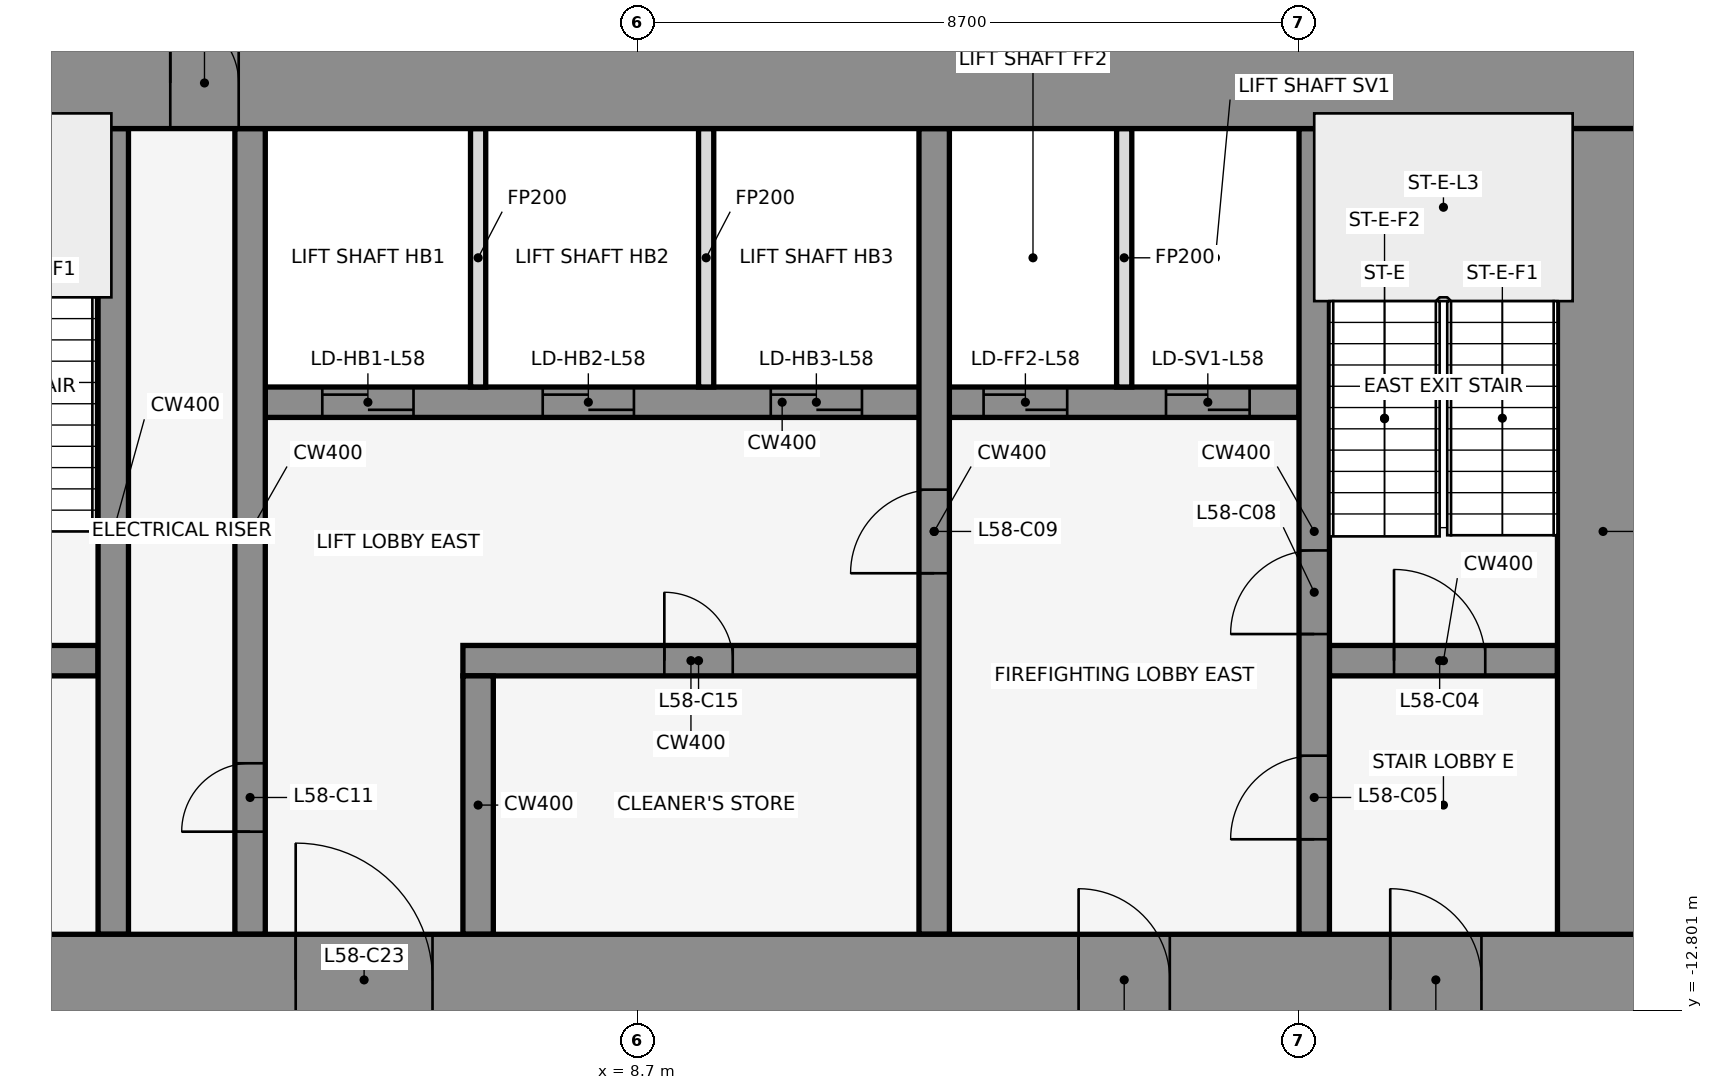
"""IFC4 building model, lengths in metres.
Left out: names, types, materials, properties, quantities, classifications, styles, units other than length and angle.
Written with IfcOpenShell. Run it as: python <this file> out.ifc"""

import sys

from ifc_helpers import new_model, si_unit, direction, frame, frame_2d, origin, place, context, subcontext, project, spatial, rectangle, extrude, element, fill, save


model = new_model("IFC4")
c1 = context("Model", 3, precision=1e-05, world=origin(), true_north=direction((0.0, 1.0)))
c2 = subcontext(c1, "Body", "Model", "MODEL_VIEW")
j1 = project(units=[si_unit("LENGTHUNIT", "METRE"), si_unit("PLANEANGLEUNIT", "RADIAN")], contexts=[c1])
p1 = place(None, origin())
s1 = spatial("IfcSite", under=j1, at=p1, CompositionType="ELEMENT")
p2 = place(p1, origin())
s2 = spatial("IfcBuilding", under=s1, at=p2, CompositionType="ELEMENT")
p3 = place(p2, frame((0.0, 0.0, 258.2)))
s3 = spatial("IfcBuildingStorey", under=s2, at=p3, CompositionType="ELEMENT", Elevation=258.2)
for number, where, z_axis, x_axis in (
    (1, (16.432, -0.105, 0.0), (0.0, 0.0, 1.0), (-0.84, 0.543, 0.0)),
    (2, (1.901, 1.08, 0.0), (0.0, 0.0, 1.0), (-0.84, -0.543, 0.0)),
):
    element("IfcWall", number, at=place(p3, frame(where, z_axis=z_axis, x_axis=x_axis)), inside=s3, PredefinedType="STANDARD", context=c2, shape_type="SweptSolid", body=[
        extrude(rectangle(XDim=2.183, YDim=0.25, at=frame_2d((1.091, 0.0))), origin(), (0.0, 0.0, 1.0), 4.05),
    ])
p4 = place(p3, frame((-1.6, -8.2, 0.0), z_axis=(0.0, 0.0, 1.0), x_axis=(1.0, 0.0, 0.0)))
e3 = element("IfcWall", 3, at=p4, inside=s3, PredefinedType="SHEAR", context=c2, shape_type="SweptSolid", body=[
    extrude(rectangle(XDim=3.2, YDim=0.4, at=frame_2d((1.6, 0.0))), origin(), (0.0, 0.0, 1.0), 4.2),
])
p5 = place(p4, frame((1.05, 0.0, 0.0)))
e4 = element("IfcOpeningElement", 4, at=p5, cuts=e3, PredefinedType="OPENING", context=c2, shape_type="SweptSolid", body=[
    extrude(rectangle(XDim=1.2, YDim=2.1, at=frame_2d((0.6, 1.05))), frame((0.0, 0.212, 0.0), z_axis=(0.0, -1.0, 0.0), x_axis=(1.0, 0.0, 0.0)), (0.0, 0.0, 1.0), 0.424),
])
p6 = place(p3, frame((6.4, -8.2, 0.0), z_axis=(0.0, 0.0, 1.0), x_axis=(1.0, 0.0, 0.0)))
e5 = element("IfcWall", 5, at=p6, inside=s3, PredefinedType="SHEAR", context=c2, shape_type="SweptSolid", body=[
    extrude(rectangle(XDim=6.0, YDim=0.4, at=frame_2d((3.0, 0.0))), origin(), (0.0, 0.0, 1.0), 4.2),
])
p7 = place(p6, frame((2.65, 0.0, 0.0)))
e6 = element("IfcOpeningElement", 6, at=p7, cuts=e5, PredefinedType="OPENING", context=c2, shape_type="SweptSolid", body=[
    extrude(rectangle(XDim=0.9, YDim=2.1, at=frame_2d((0.45, 1.05))), frame((0.0, 0.212, 0.0), z_axis=(0.0, -1.0, 0.0), x_axis=(1.0, 0.0, 0.0)), (0.0, 0.0, 1.0), 0.424),
])
p8 = place(p3, frame((17.8, -8.2, 0.0), z_axis=(0.0, 0.0, 1.0), x_axis=(1.0, 0.0, 0.0)))
e7 = element("IfcWall", 7, at=p8, inside=s3, PredefinedType="SHEAR", context=c2, shape_type="SweptSolid", body=[
    extrude(rectangle(XDim=3.0, YDim=0.4, at=frame_2d((1.5, 0.0))), origin(), (0.0, 0.0, 1.0), 4.2),
])
p9 = place(p8, frame((0.85, 0.0, 0.0)))
e8 = element("IfcOpeningElement", 8, at=p9, cuts=e7, PredefinedType="OPENING", context=c2, shape_type="SweptSolid", body=[
    extrude(rectangle(XDim=1.2, YDim=2.1, at=frame_2d((0.6, 1.05))), frame((0.0, 0.212, 0.0), z_axis=(0.0, -1.0, 0.0), x_axis=(1.0, 0.0, 0.0)), (0.0, 0.0, 1.0), 0.424),
])
p10 = place(p3, frame((3.8, -4.8, 0.0), z_axis=(0.0, 0.0, 1.0), x_axis=(1.0, 0.0, 0.0)))
e9 = element("IfcWall", 9, at=p10, inside=s3, PredefinedType="SHEAR", context=c2, shape_type="SweptSolid", body=[
    extrude(rectangle(XDim=13.6, YDim=0.4, at=frame_2d((6.8, 0.0))), origin(), (0.0, 0.0, 1.0), 4.2),
])
p11 = place(p10, frame((0.75, 0.0, 0.0)))
e10 = element("IfcOpeningElement", 10, at=p11, cuts=e9, PredefinedType="OPENING", context=c2, shape_type="SweptSolid", body=[
    extrude(rectangle(XDim=1.2, YDim=2.1, at=frame_2d((0.6, 1.05))), frame((0.0, 0.212, 0.0), z_axis=(0.0, -1.0, 0.0), x_axis=(1.0, 0.0, 0.0)), (0.0, 0.0, 1.0), 0.424),
])
p12 = place(p10, frame((3.65, 0.0, 0.0)))
e11 = element("IfcOpeningElement", 11, at=p12, cuts=e9, PredefinedType="OPENING", context=c2, shape_type="SweptSolid", body=[
    extrude(rectangle(XDim=1.2, YDim=2.1, at=frame_2d((0.6, 1.05))), frame((0.0, 0.212, 0.0), z_axis=(0.0, -1.0, 0.0), x_axis=(1.0, 0.0, 0.0)), (0.0, 0.0, 1.0), 0.424),
])
p13 = place(p10, frame((6.65, 0.0, 0.0)))
e12 = element("IfcOpeningElement", 12, at=p13, cuts=e9, PredefinedType="OPENING", context=c2, shape_type="SweptSolid", body=[
    extrude(rectangle(XDim=1.2, YDim=2.1, at=frame_2d((0.6, 1.05))), frame((0.0, 0.212, 0.0), z_axis=(0.0, -1.0, 0.0), x_axis=(1.0, 0.0, 0.0)), (0.0, 0.0, 1.0), 0.424),
])
p14 = place(p10, frame((9.45, 0.0, 0.0)))
e13 = element("IfcOpeningElement", 13, at=p14, cuts=e9, PredefinedType="OPENING", context=c2, shape_type="SweptSolid", body=[
    extrude(rectangle(XDim=1.1, YDim=2.1, at=frame_2d((0.55, 1.05))), frame((0.0, 0.212, 0.0), z_axis=(0.0, -1.0, 0.0), x_axis=(1.0, 0.0, 0.0)), (0.0, 0.0, 1.0), 0.424),
])
p15 = place(p10, frame((11.85, 0.0, 0.0)))
e14 = element("IfcOpeningElement", 14, at=p15, cuts=e9, PredefinedType="OPENING", context=c2, shape_type="SweptSolid", body=[
    extrude(rectangle(XDim=1.1, YDim=2.1, at=frame_2d((0.55, 1.05))), frame((0.0, 0.212, 0.0), z_axis=(0.0, -1.0, 0.0), x_axis=(1.0, 0.0, 0.0)), (0.0, 0.0, 1.0), 0.424),
])
p16 = place(p3, frame((1.8, -11.8, 0.0), z_axis=(0.0, 0.0, 1.0), x_axis=(0.0, 1.0, 0.0)))
e15 = element("IfcWall", 15, at=p16, inside=s3, PredefinedType="SHEAR", context=c2, shape_type="SweptSolid", body=[
    extrude(rectangle(XDim=10.6, YDim=0.4, at=frame_2d((5.3, 0.0))), origin(), (0.0, 0.0, 1.0), 4.2),
])
p17 = place(p3, frame((3.6, -11.8, 0.0), z_axis=(0.0, 0.0, 1.0), x_axis=(0.0, 1.0, 0.0)))
e16 = element("IfcWall", 16, at=p17, inside=s3, PredefinedType="SHEAR", context=c2, shape_type="SweptSolid", body=[
    extrude(rectangle(XDim=10.6, YDim=0.4, at=frame_2d((5.3, 0.0))), origin(), (0.0, 0.0, 1.0), 4.2),
])
p18 = place(p17, frame((1.35, 0.0, 0.0)))
e17 = element("IfcOpeningElement", 17, at=p18, cuts=e16, PredefinedType="OPENING", context=c2, shape_type="SweptSolid", body=[
    extrude(rectangle(XDim=0.9, YDim=2.1, at=frame_2d((0.45, 1.05))), frame((0.0, 0.212, 0.0), z_axis=(0.0, -1.0, 0.0), x_axis=(1.0, 0.0, 0.0)), (0.0, 0.0, 1.0), 0.424),
])
p19 = place(p3, frame((6.6, -11.8, 0.0), z_axis=(0.0, 0.0, 1.0), x_axis=(0.0, 1.0, 0.0)))
e18 = element("IfcWall", 18, at=p19, inside=s3, PredefinedType="SHEAR", context=c2, shape_type="SweptSolid", body=[
    extrude(rectangle(XDim=3.4, YDim=0.4, at=frame_2d((1.7, 0.0))), origin(), (0.0, 0.0, 1.0), 4.2),
])
for number, where, z_axis, x_axis in (
    (19, (6.6, -4.6, 0.0), (0.0, 0.0, 1.0), (0.0, 1.0, 0.0)),
    (20, (9.6, -4.6, 0.0), (0.0, 0.0, 1.0), (0.0, 1.0, 0.0)),
):
    element("IfcWall", number, at=place(p3, frame(where, z_axis=z_axis, x_axis=x_axis)), inside=s3, PredefinedType="PARTITIONING", context=c2, shape_type="SweptSolid", body=[
        extrude(rectangle(XDim=3.4, YDim=0.2, at=frame_2d((1.7, 0.0))), origin(), (0.0, 0.0, 1.0), 3.118),
    ])
p20 = place(p3, frame((12.6, -11.8, 0.0), z_axis=(0.0, 0.0, 1.0), x_axis=(0.0, 1.0, 0.0)))
e21 = element("IfcWall", 21, at=p20, inside=s3, PredefinedType="SHEAR", context=c2, shape_type="SweptSolid", body=[
    extrude(rectangle(XDim=10.6, YDim=0.4, at=frame_2d((5.3, 0.0))), origin(), (0.0, 0.0, 1.0), 4.2),
])
p21 = place(p20, frame((4.75, 0.0, 0.0)))
e22 = element("IfcOpeningElement", 22, at=p21, cuts=e21, PredefinedType="OPENING", context=c2, shape_type="SweptSolid", body=[
    extrude(rectangle(XDim=1.1, YDim=2.1, at=frame_2d((0.55, 1.05))), frame((0.0, 0.212, 0.0), z_axis=(0.0, -1.0, 0.0), x_axis=(1.0, 0.0, 0.0)), (0.0, 0.0, 1.0), 0.424),
])
p22 = place(p3, frame((15.1, -4.6, 0.0), z_axis=(0.0, 0.0, 1.0), x_axis=(0.0, 1.0, 0.0)))
e23 = element("IfcWall", 23, at=p22, inside=s3, PredefinedType="PARTITIONING", context=c2, shape_type="SweptSolid", body=[
    extrude(rectangle(XDim=3.4, YDim=0.2, at=frame_2d((1.7, 0.0))), origin(), (0.0, 0.0, 1.0), 3.118),
])
p23 = place(p3, frame((17.6, -11.8, 0.0), z_axis=(0.0, 0.0, 1.0), x_axis=(0.0, 1.0, 0.0)))
e24 = element("IfcWall", 24, at=p23, inside=s3, PredefinedType="SHEAR", context=c2, shape_type="SweptSolid", body=[
    extrude(rectangle(XDim=10.6, YDim=0.4, at=frame_2d((5.3, 0.0))), origin(), (0.0, 0.0, 1.0), 4.2),
])
p24 = place(p23, frame((1.25, 0.0, 0.0)))
e25 = element("IfcOpeningElement", 25, at=p24, cuts=e24, PredefinedType="OPENING", context=c2, shape_type="SweptSolid", body=[
    extrude(rectangle(XDim=1.1, YDim=2.1, at=frame_2d((0.55, 1.05))), frame((0.0, 0.212, 0.0), z_axis=(0.0, -1.0, 0.0), x_axis=(1.0, 0.0, 0.0)), (0.0, 0.0, 1.0), 0.424),
])
p25 = place(p23, frame((3.95, 0.0, 0.0)))
e26 = element("IfcOpeningElement", 26, at=p25, cuts=e24, PredefinedType="OPENING", context=c2, shape_type="SweptSolid", body=[
    extrude(rectangle(XDim=1.1, YDim=2.1, at=frame_2d((0.55, 1.05))), frame((0.0, 0.212, 0.0), z_axis=(0.0, -1.0, 0.0), x_axis=(1.0, 0.0, 0.0)), (0.0, 0.0, 1.0), 0.424),
])
p26 = place(p3, frame((-22.0, -0.6, 0.0), z_axis=(0.0, 0.0, 1.0), x_axis=(1.0, 0.0, 0.0)))
e27 = element("IfcWall", 27, at=p26, inside=s3, PredefinedType="SHEAR", context=c2, shape_type="SweptSolid", body=[
    extrude(rectangle(XDim=44.0, YDim=1.2, at=frame_2d((22.0, 0.0))), origin(), (0.0, 0.0, 1.0), 4.2),
])
p27 = place(p26, frame((18.55, 0.0, 0.0)))
e28 = element("IfcOpeningElement", 28, at=p27, cuts=e27, PredefinedType="OPENING", context=c2, shape_type="SweptSolid", body=[
    extrude(rectangle(XDim=0.9, YDim=2.1, at=frame_2d((0.45, 1.05))), frame((0.0, 0.612, 0.0), z_axis=(0.0, -1.0, 0.0), x_axis=(1.0, 0.0, 0.0)), (0.0, 0.0, 1.0), 1.224),
])
p28 = place(p26, frame((24.55, 0.0, 0.0)))
e29 = element("IfcOpeningElement", 29, at=p28, cuts=e27, PredefinedType="OPENING", context=c2, shape_type="SweptSolid", body=[
    extrude(rectangle(XDim=0.9, YDim=2.1, at=frame_2d((0.45, 1.05))), frame((0.0, 0.612, 0.0), z_axis=(0.0, -1.0, 0.0), x_axis=(1.0, 0.0, 0.0)), (0.0, 0.0, 1.0), 1.224),
])
p29 = place(p3, frame((-22.0, -12.4, 0.0), z_axis=(0.0, 0.0, 1.0), x_axis=(1.0, 0.0, 0.0)))
e30 = element("IfcWall", 30, at=p29, inside=s3, PredefinedType="SHEAR", context=c2, shape_type="SweptSolid", body=[
    extrude(rectangle(XDim=44.0, YDim=1.2, at=frame_2d((22.0, 0.0))), origin(), (0.0, 0.0, 1.0), 4.2),
])
p30 = place(p29, frame((2.2, 0.0, 0.0)))
e31 = element("IfcOpeningElement", 31, at=p30, cuts=e30, PredefinedType="OPENING", context=c2, shape_type="SweptSolid", body=[
    extrude(rectangle(XDim=1.2, YDim=2.1, at=frame_2d((0.6, 1.05))), frame((0.0, 0.612, 0.0), z_axis=(0.0, -1.0, 0.0), x_axis=(1.0, 0.0, 0.0)), (0.0, 0.0, 1.0), 1.224),
])
p31 = place(p29, frame((21.4, 0.0, 0.0)))
e32 = element("IfcOpeningElement", 32, at=p31, cuts=e30, PredefinedType="OPENING", context=c2, shape_type="SweptSolid", body=[
    extrude(rectangle(XDim=1.2, YDim=2.1, at=frame_2d((0.6, 1.05))), frame((0.0, 0.612, 0.0), z_axis=(0.0, -1.0, 0.0), x_axis=(1.0, 0.0, 0.0)), (0.0, 0.0, 1.0), 1.224),
])
p32 = place(p29, frame((40.6, 0.0, 0.0)))
e33 = element("IfcOpeningElement", 33, at=p32, cuts=e30, PredefinedType="OPENING", context=c2, shape_type="SweptSolid", body=[
    extrude(rectangle(XDim=1.2, YDim=2.1, at=frame_2d((0.6, 1.05))), frame((0.0, 0.612, 0.0), z_axis=(0.0, -1.0, 0.0), x_axis=(1.0, 0.0, 0.0)), (0.0, 0.0, 1.0), 1.224),
])
p33 = place(p29, frame((16.0, 0.0, 0.0)))
e34 = element("IfcOpeningElement", 34, at=p33, cuts=e30, PredefinedType="OPENING", context=c2, shape_type="SweptSolid", body=[
    extrude(rectangle(XDim=1.8, YDim=2.1, at=frame_2d((0.9, 1.05))), frame((0.0, 0.612, 0.0), z_axis=(0.0, -1.0, 0.0), x_axis=(1.0, 0.0, 0.0)), (0.0, 0.0, 1.0), 1.224),
])
p34 = place(p29, frame((6.3, 0.0, 0.0)))
e35 = element("IfcOpeningElement", 35, at=p34, cuts=e30, PredefinedType="OPENING", context=c2, shape_type="SweptSolid", body=[
    extrude(rectangle(XDim=1.2, YDim=2.1, at=frame_2d((0.6, 1.05))), frame((0.0, 0.612, 0.0), z_axis=(0.0, -1.0, 0.0), x_axis=(1.0, 0.0, 0.0)), (0.0, 0.0, 1.0), 1.224),
])
p35 = place(p29, frame((26.2, 0.0, 0.0)))
e36 = element("IfcOpeningElement", 36, at=p35, cuts=e30, PredefinedType="OPENING", context=c2, shape_type="SweptSolid", body=[
    extrude(rectangle(XDim=1.8, YDim=2.1, at=frame_2d((0.9, 1.05))), frame((0.0, 0.612, 0.0), z_axis=(0.0, -1.0, 0.0), x_axis=(1.0, 0.0, 0.0)), (0.0, 0.0, 1.0), 1.224),
])
p36 = place(p29, frame((36.5, 0.0, 0.0)))
e37 = element("IfcOpeningElement", 37, at=p36, cuts=e30, PredefinedType="OPENING", context=c2, shape_type="SweptSolid", body=[
    extrude(rectangle(XDim=1.2, YDim=2.1, at=frame_2d((0.6, 1.05))), frame((0.0, 0.612, 0.0), z_axis=(0.0, -1.0, 0.0), x_axis=(1.0, 0.0, 0.0)), (0.0, 0.0, 1.0), 1.224),
])
p37 = place(p3, frame((21.4, -11.8, 0.0), z_axis=(0.0, 0.0, 1.0), x_axis=(0.0, 1.0, 0.0)))
e38 = element("IfcWall", 38, at=p37, inside=s3, PredefinedType="SHEAR", context=c2, shape_type="SweptSolid", body=[
    extrude(rectangle(XDim=10.6, YDim=1.2, at=frame_2d((5.3, 0.0))), origin(), (0.0, 0.0, 1.0), 4.2),
])
p38 = place(p9, origin())
e39 = element("IfcDoor", 39, at=p38, inside=s3, OperationType="SINGLE_SWING_RIGHT", PredefinedType="DOOR", context=c2, shape_type="SweptSolid", body=[
    extrude(rectangle(XDim=1.2, YDim=2.1, at=frame_2d((0.6, 1.05))), frame((0.0, 0.025, 0.0), z_axis=(0.0, -1.0, 0.0), x_axis=(1.0, 0.0, 0.0)), (0.0, 0.0, 1.0), 0.05),
])
fill(e8, e39)
p39 = place(p24, origin())
e40 = element("IfcDoor", 40, at=p39, inside=s3, OperationType="SINGLE_SWING_LEFT", PredefinedType="DOOR", context=c2, shape_type="SweptSolid", body=[
    extrude(rectangle(XDim=1.1, YDim=2.1, at=frame_2d((0.55, 1.05))), frame((0.0, 0.025, 0.0), z_axis=(0.0, -1.0, 0.0), x_axis=(1.0, 0.0, 0.0)), (0.0, 0.0, 1.0), 0.05),
])
fill(e25, e40)
p40 = place(p11, origin())
e41 = element("IfcDoor", 41, at=p40, inside=s3, OperationType="DOUBLE_DOOR_SLIDING", PredefinedType="DOOR", context=c2, shape_type="SweptSolid", body=[
    extrude(rectangle(XDim=1.2, YDim=2.1, at=frame_2d((0.6, 1.05))), frame((0.0, 0.025, 0.0), z_axis=(0.0, -1.0, 0.0), x_axis=(1.0, 0.0, 0.0)), (0.0, 0.0, 1.0), 0.05),
])
fill(e10, e41)
p41 = place(p12, origin())
e42 = element("IfcDoor", 42, at=p41, inside=s3, OperationType="DOUBLE_DOOR_SLIDING", PredefinedType="DOOR", context=c2, shape_type="SweptSolid", body=[
    extrude(rectangle(XDim=1.2, YDim=2.1, at=frame_2d((0.6, 1.05))), frame((0.0, 0.025, 0.0), z_axis=(0.0, -1.0, 0.0), x_axis=(1.0, 0.0, 0.0)), (0.0, 0.0, 1.0), 0.05),
])
fill(e11, e42)
p42 = place(p13, origin())
e43 = element("IfcDoor", 43, at=p42, inside=s3, OperationType="DOUBLE_DOOR_SLIDING", PredefinedType="DOOR", context=c2, shape_type="SweptSolid", body=[
    extrude(rectangle(XDim=1.2, YDim=2.1, at=frame_2d((0.6, 1.05))), frame((0.0, 0.025, 0.0), z_axis=(0.0, -1.0, 0.0), x_axis=(1.0, 0.0, 0.0)), (0.0, 0.0, 1.0), 0.05),
])
fill(e12, e43)
p43 = place(p14, origin())
e44 = element("IfcDoor", 44, at=p43, inside=s3, OperationType="DOUBLE_DOOR_SLIDING", PredefinedType="DOOR", context=c2, shape_type="SweptSolid", body=[
    extrude(rectangle(XDim=1.1, YDim=2.1, at=frame_2d((0.55, 1.05))), frame((0.0, 0.025, 0.0), z_axis=(0.0, -1.0, 0.0), x_axis=(1.0, 0.0, 0.0)), (0.0, 0.0, 1.0), 0.05),
])
fill(e13, e44)
p44 = place(p15, origin())
e45 = element("IfcDoor", 45, at=p44, inside=s3, OperationType="DOUBLE_DOOR_SLIDING", PredefinedType="DOOR", context=c2, shape_type="SweptSolid", body=[
    extrude(rectangle(XDim=1.1, YDim=2.1, at=frame_2d((0.55, 1.05))), frame((0.0, 0.025, 0.0), z_axis=(0.0, -1.0, 0.0), x_axis=(1.0, 0.0, 0.0)), (0.0, 0.0, 1.0), 0.05),
])
fill(e14, e45)
p45 = place(p25, origin())
e46 = element("IfcDoor", 46, at=p45, inside=s3, OperationType="SINGLE_SWING_RIGHT", PredefinedType="DOOR", context=c2, shape_type="SweptSolid", body=[
    extrude(rectangle(XDim=1.1, YDim=2.1, at=frame_2d((0.55, 1.05))), frame((0.0, 0.025, 0.0), z_axis=(0.0, -1.0, 0.0), x_axis=(1.0, 0.0, 0.0)), (0.0, 0.0, 1.0), 0.05),
])
fill(e26, e46)
p46 = place(p21, frame((1.1, 0.0, 0.0), z_axis=(0.0, 0.0, 1.0), x_axis=(-1.0, 0.0, 0.0)))
e47 = element("IfcDoor", 47, at=p46, inside=s3, OperationType="SINGLE_SWING_RIGHT", PredefinedType="DOOR", context=c2, shape_type="SweptSolid", body=[
    extrude(rectangle(XDim=1.1, YDim=2.1, at=frame_2d((0.55, 1.05))), frame((0.0, 0.025, 0.0), z_axis=(0.0, -1.0, 0.0), x_axis=(1.0, 0.0, 0.0)), (0.0, 0.0, 1.0), 0.05),
])
fill(e22, e47)
p47 = place(p18, origin())
e48 = element("IfcDoor", 48, at=p47, inside=s3, OperationType="SINGLE_SWING_LEFT", PredefinedType="DOOR", context=c2, shape_type="SweptSolid", body=[
    extrude(rectangle(XDim=0.9, YDim=2.1, at=frame_2d((0.45, 1.05))), frame((0.0, 0.025, 0.0), z_axis=(0.0, -1.0, 0.0), x_axis=(1.0, 0.0, 0.0)), (0.0, 0.0, 1.0), 0.05),
])
fill(e17, e48)
p48 = place(p7, frame((0.9, 0.0, 0.0), z_axis=(0.0, 0.0, 1.0), x_axis=(-1.0, 0.0, 0.0)))
e49 = element("IfcDoor", 49, at=p48, inside=s3, OperationType="SINGLE_SWING_RIGHT", PredefinedType="DOOR", context=c2, shape_type="SweptSolid", body=[
    extrude(rectangle(XDim=0.9, YDim=2.1, at=frame_2d((0.45, 1.05))), frame((0.0, 0.025, 0.0), z_axis=(0.0, -1.0, 0.0), x_axis=(1.0, 0.0, 0.0)), (0.0, 0.0, 1.0), 0.05),
])
fill(e6, e49)
p49 = place(p28, origin())
e50 = element("IfcDoor", 50, at=p49, inside=s3, OperationType="SINGLE_SWING_LEFT", PredefinedType="DOOR", context=c2, shape_type="SweptSolid", body=[
    extrude(rectangle(XDim=0.9, YDim=2.1, at=frame_2d((0.45, 1.05))), frame((0.0, 0.025, 0.0), z_axis=(0.0, -1.0, 0.0), x_axis=(1.0, 0.0, 0.0)), (0.0, 0.0, 1.0), 0.05),
])
fill(e29, e50)
p50 = place(p32, frame((1.2, 0.0, 0.0), z_axis=(0.0, 0.0, 1.0), x_axis=(-1.0, 0.0, 0.0)))
e51 = element("IfcDoor", 51, at=p50, inside=s3, OperationType="SINGLE_SWING_RIGHT", PredefinedType="DOOR", context=c2, shape_type="SweptSolid", body=[
    extrude(rectangle(XDim=1.2, YDim=2.1, at=frame_2d((0.6, 1.05))), frame((0.0, 0.025, 0.0), z_axis=(0.0, -1.0, 0.0), x_axis=(1.0, 0.0, 0.0)), (0.0, 0.0, 1.0), 0.05),
])
fill(e33, e51)
p51 = place(p35, origin())
e52 = element("IfcDoor", 52, at=p51, inside=s3, OperationType="SINGLE_SWING_LEFT", PredefinedType="DOOR", context=c2, shape_type="SweptSolid", body=[
    extrude(rectangle(XDim=1.8, YDim=2.1, at=frame_2d((0.9, 1.05))), frame((0.0, 0.025, 0.0), z_axis=(0.0, -1.0, 0.0), x_axis=(1.0, 0.0, 0.0)), (0.0, 0.0, 1.0), 0.05),
])
fill(e36, e52)
p52 = place(p36, frame((1.2, 0.0, 0.0), z_axis=(0.0, 0.0, 1.0), x_axis=(-1.0, 0.0, 0.0)))
e53 = element("IfcDoor", 53, at=p52, inside=s3, OperationType="SINGLE_SWING_RIGHT", PredefinedType="DOOR", context=c2, shape_type="SweptSolid", body=[
    extrude(rectangle(XDim=1.2, YDim=2.1, at=frame_2d((0.6, 1.05))), frame((0.0, 0.025, 0.0), z_axis=(0.0, -1.0, 0.0), x_axis=(1.0, 0.0, 0.0)), (0.0, 0.0, 1.0), 0.05),
])
fill(e37, e53)
save(model, sys.argv[1])
